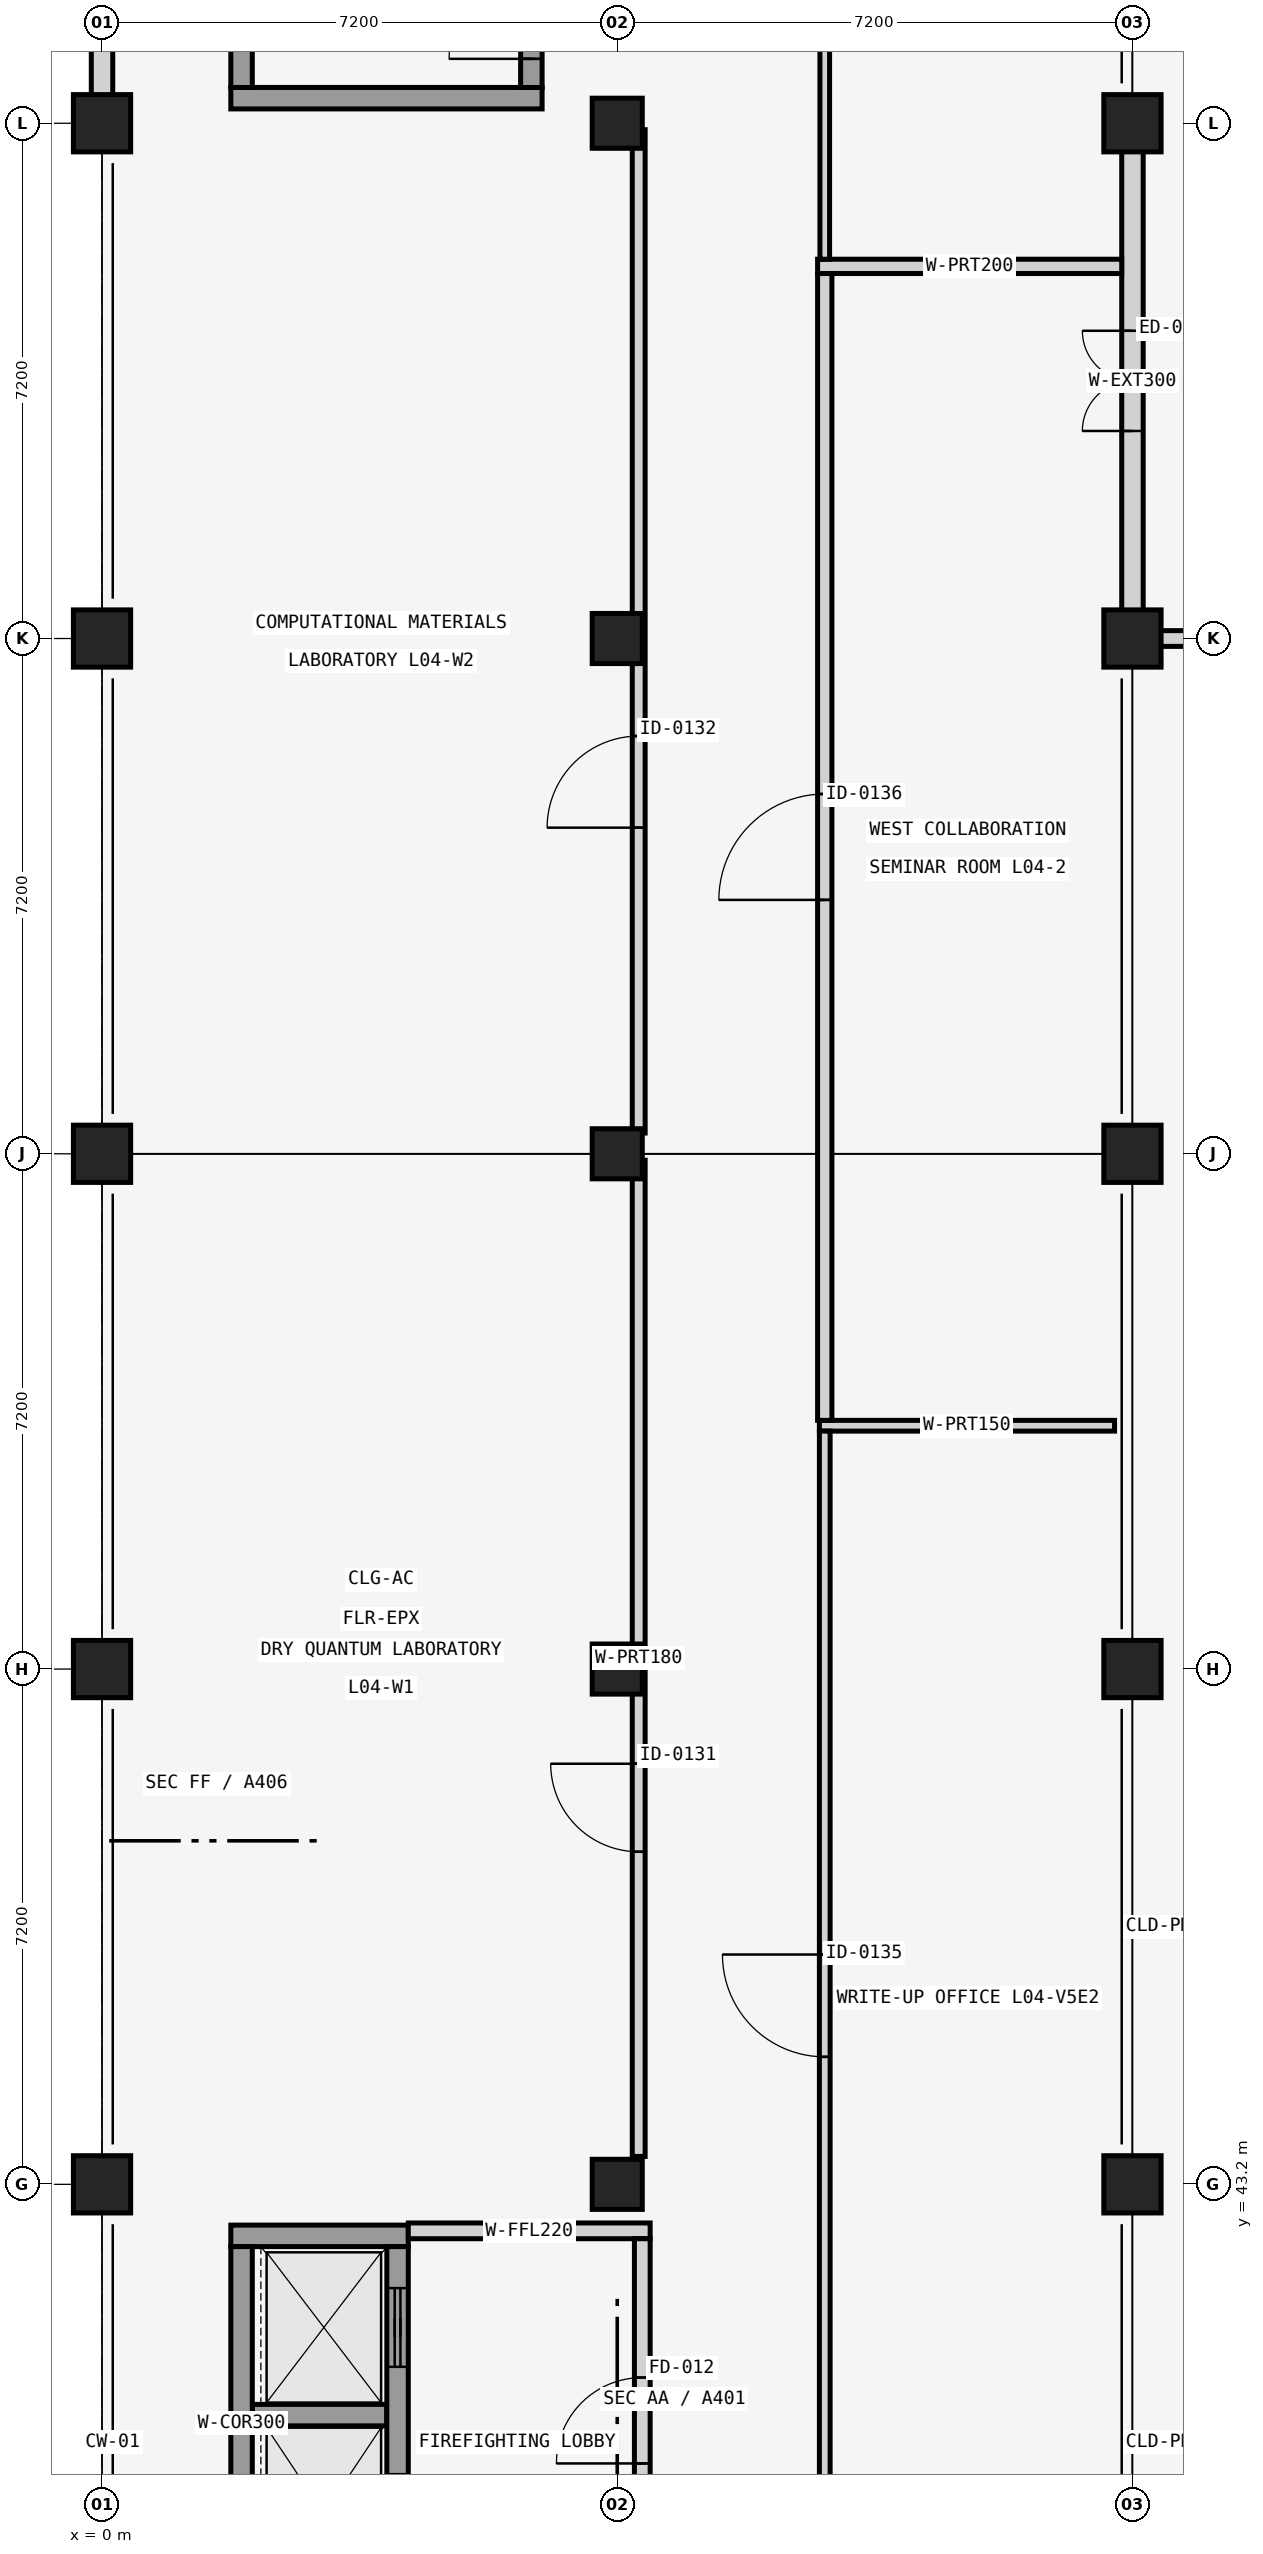
"""IFC4 building model, lengths in metres.
Left out: names, types, materials, properties, quantities, classifications, styles, units other than length and angle.
Written with IfcOpenShell. Run it as: python <this file> out.ifc"""

import sys

from ifc_helpers import new_model, si_unit, direction, frame, frame_2d, origin, origin_2d, place, context, subcontext, project, spatial, rectangle, extrude, element, fill, save


model = new_model("IFC4")
c1 = context("Model", 3, precision=1e-05, world=origin(), true_north=direction((0.0, 1.0)))
c2 = subcontext(c1, "Body", "Model", "MODEL_VIEW")
j1 = project(units=[si_unit("LENGTHUNIT", "METRE"), si_unit("PLANEANGLEUNIT", "RADIAN")], contexts=[c1])
p1 = place(None, origin())
s1 = spatial("IfcSite", under=j1, at=p1, CompositionType="ELEMENT")
p2 = place(p1, origin())
s2 = spatial("IfcBuilding", under=s1, at=p2, CompositionType="ELEMENT")
p3 = place(p2, frame((0.0, 0.0, 17.28)))
s3 = spatial("IfcBuildingStorey", under=s2, at=p3, CompositionType="ELEMENT", Elevation=17.28)
for number, where, z_axis, x_axis in (
    (1, (0.0, 43.2, 0.0), (0.0, 0.0, 1.0), (1.0, 0.0, 0.0)),
    (2, (0.0, 50.4, 0.0), (0.0, 0.0, 1.0), (1.0, 0.0, 0.0)),
    (3, (0.0, 57.6, 0.0), (0.0, 0.0, 1.0), (1.0, 0.0, 0.0)),
    (4, (0.0, 64.8, 0.0), (0.0, 0.0, 1.0), (1.0, 0.0, 0.0)),
    (5, (0.0, 72.0, 0.0), (0.0, 0.0, 1.0), (1.0, 0.0, 0.0)),
):
    element("IfcColumn", number, at=place(p3, frame(where, z_axis=z_axis, x_axis=x_axis)), inside=s3, PredefinedType="COLUMN", context=c2, shape_type="SweptSolid", body=[
        extrude(rectangle(XDim=0.8, YDim=0.8, at=origin_2d()), origin(), (0.0, 0.0, 1.0), 4.16),
    ])
for number, where, z_axis, x_axis in (
    (6, (7.2, 43.2, 0.0), (0.0, 0.0, 1.0), (1.0, 0.0, 0.0)),
    (7, (7.2, 50.4, 0.0), (0.0, 0.0, 1.0), (1.0, 0.0, 0.0)),
    (8, (7.2, 57.6, 0.0), (0.0, 0.0, 1.0), (1.0, 0.0, 0.0)),
    (9, (7.2, 64.8, 0.0), (0.0, 0.0, 1.0), (1.0, 0.0, 0.0)),
    (10, (7.2, 72.0, 0.0), (0.0, 0.0, 1.0), (1.0, 0.0, 0.0)),
):
    element("IfcColumn", number, at=place(p3, frame(where, z_axis=z_axis, x_axis=x_axis)), inside=s3, PredefinedType="COLUMN", context=c2, shape_type="SweptSolid", body=[
        extrude(rectangle(XDim=0.7, YDim=0.7, at=origin_2d()), origin(), (0.0, 0.0, 1.0), 4.16),
    ])
for number, where, z_axis, x_axis in (
    (11, (14.4, 43.2, 0.0), (0.0, 0.0, 1.0), (1.0, 0.0, 0.0)),
    (12, (14.4, 50.4, 0.0), (0.0, 0.0, 1.0), (1.0, 0.0, 0.0)),
    (13, (14.4, 57.6, 0.0), (0.0, 0.0, 1.0), (1.0, 0.0, 0.0)),
    (14, (14.4, 64.8, 0.0), (0.0, 0.0, 1.0), (1.0, 0.0, 0.0)),
    (15, (14.4, 72.0, 0.0), (0.0, 0.0, 1.0), (1.0, 0.0, 0.0)),
):
    element("IfcColumn", number, at=place(p3, frame(where, z_axis=z_axis, x_axis=x_axis)), inside=s3, PredefinedType="COLUMN", context=c2, shape_type="SweptSolid", body=[
        extrude(rectangle(XDim=0.8, YDim=0.8, at=origin_2d()), origin(), (0.0, 0.0, 1.0), 4.16),
    ])
p4 = place(p3, frame((14.4, 65.19, 0.0), z_axis=(0.0, 0.0, 1.0), x_axis=(0.0, 1.0, 0.0)))
e16 = element("IfcWall", 16, at=p4, inside=s3, PredefinedType="SOLIDWALL", context=c2, shape_type="SweptSolid", body=[
    extrude(rectangle(XDim=6.42, YDim=0.3, at=frame_2d((3.21, 0.0))), origin(), (0.0, 0.0, 1.0), 3.21),
])
p5 = place(p4, frame((2.51, 0.0, 0.0)))
e17 = element("IfcOpeningElement", 17, at=p5, cuts=e16, PredefinedType="OPENING", context=c2, shape_type="SweptSolid", body=[
    extrude(rectangle(XDim=1.4, YDim=2.25, at=frame_2d((0.7, 1.125))), frame((0.0, 0.16, 0.0), z_axis=(0.0, -1.0, 0.0), x_axis=(1.0, 0.0, 0.0)), (0.0, 0.0, 1.0), 0.32),
])
p6 = place(p3, frame((0.0, 72.39, 0.0), z_axis=(0.0, 0.0, 1.0), x_axis=(0.0, 1.0, 0.0)))
e18 = element("IfcWall", 18, at=p6, inside=s3, PredefinedType="SOLIDWALL", context=c2, shape_type="SweptSolid", body=[
    extrude(rectangle(XDim=6.42, YDim=0.3, at=frame_2d((3.21, 0.0))), origin(), (0.0, 0.0, 1.0), 3.21),
])
p7 = place(p6, frame((2.985, 0.0, 0.65)))
e19 = element("IfcOpeningElement", 19, at=p7, cuts=e18, PredefinedType="OPENING", context=c2, shape_type="SweptSolid", body=[
    extrude(rectangle(XDim=0.45, YDim=2.4, at=frame_2d((0.225, 1.2))), frame((0.0, 0.16, 0.0), z_axis=(0.0, -1.0, 0.0), x_axis=(1.0, 0.0, 0.0)), (0.0, 0.0, 1.0), 0.32),
])
p8 = place(p3, frame((14.4, 64.8, 0.0), z_axis=(0.0, 0.0, 1.0), x_axis=(1.0, 0.0, 0.0)))
e20 = element("IfcWall", 20, at=p8, inside=s3, PredefinedType="PARAPET", context=c2, shape_type="SweptSolid", body=[
    extrude(rectangle(XDim=28.8, YDim=0.22, at=frame_2d((14.4, 0.0))), origin(), (0.0, 0.0, 1.0), 0.9),
])
p9 = place(p3, frame((1.8, 42.48, 0.0), z_axis=(0.0, 0.0, 1.0), x_axis=(1.0, 0.0, 0.0)))
e21 = element("IfcWall", 21, at=p9, inside=s3, PredefinedType="SHEAR", context=c2, shape_type="SweptSolid", body=[
    extrude(rectangle(XDim=2.48, YDim=0.3, at=frame_2d((1.24, 0.0))), origin(), (0.0, 0.0, 1.0), 3.81),
])
p10 = place(p3, frame((2.1, 39.975, 0.0), z_axis=(0.0, 0.0, 1.0), x_axis=(1.0, 0.0, 0.0)))
e22 = element("IfcWall", 22, at=p10, inside=s3, PredefinedType="SHEAR", context=c2, shape_type="SweptSolid", body=[
    extrude(rectangle(XDim=1.88, YDim=0.3, at=frame_2d((0.94, 0.0))), origin(), (0.0, 0.0, 1.0), 3.81),
])
p11 = place(p3, frame((1.95, 37.4, 0.0), z_axis=(0.0, 0.0, 1.0), x_axis=(0.0, 1.0, 0.0)))
e23 = element("IfcWall", 23, at=p11, inside=s3, PredefinedType="SHEAR", context=c2, shape_type="SweptSolid", body=[
    extrude(rectangle(XDim=4.93, YDim=0.3, at=frame_2d((2.465, 0.0))), origin(), (0.0, 0.0, 1.0), 3.81),
])
p12 = place(p3, frame((4.13, 37.4, 0.0), z_axis=(0.0, 0.0, 1.0), x_axis=(0.0, 1.0, 0.0)))
e24 = element("IfcWall", 24, at=p12, inside=s3, PredefinedType="SHEAR", context=c2, shape_type="SweptSolid", body=[
    extrude(rectangle(XDim=4.93, YDim=0.3, at=frame_2d((2.465, 0.0))), origin(), (0.0, 0.0, 1.0), 3.81),
])
p13 = place(p12, frame((0.65, 0.0, 0.0)))
e25 = element("IfcOpeningElement", 25, at=p13, cuts=e24, PredefinedType="OPENING", context=c2, shape_type="SweptSolid", body=[
    extrude(rectangle(XDim=1.1, YDim=2.2, at=frame_2d((0.55, 1.1))), frame((0.0, 0.16, 0.0), z_axis=(0.0, -1.0, 0.0), x_axis=(1.0, 0.0, 0.0)), (0.0, 0.0, 1.0), 0.32),
])
p14 = place(p12, frame((3.25, 0.0, 0.0)))
e26 = element("IfcOpeningElement", 26, at=p14, cuts=e24, PredefinedType="OPENING", context=c2, shape_type="SweptSolid", body=[
    extrude(rectangle(XDim=1.1, YDim=2.2, at=frame_2d((0.55, 1.1))), frame((0.0, 0.16, 0.0), z_axis=(0.0, -1.0, 0.0), x_axis=(1.0, 0.0, 0.0)), (0.0, 0.0, 1.0), 0.32),
])
p15 = place(p3, frame((4.28, 42.55, 0.0), z_axis=(0.0, 0.0, 1.0), x_axis=(1.0, 0.0, 0.0)))
e27 = element("IfcWall", 27, at=p15, inside=s3, PredefinedType="SOLIDWALL", context=c2, shape_type="SweptSolid", body=[
    extrude(rectangle(XDim=3.38, YDim=0.22, at=frame_2d((1.69, 0.0))), origin(), (0.0, 0.0, 1.0), 3.01),
])
p16 = place(p3, frame((7.55, 37.36, 0.0), z_axis=(0.0, 0.0, 1.0), x_axis=(0.0, 1.0, 0.0)))
e28 = element("IfcWall", 28, at=p16, inside=s3, PredefinedType="SOLIDWALL", context=c2, shape_type="SweptSolid", body=[
    extrude(rectangle(XDim=5.08, YDim=0.22, at=frame_2d((2.54, 0.0))), origin(), (0.0, 0.0, 1.0), 3.51),
])
p17 = place(p16, frame((1.94, 0.0, 0.0)))
e29 = element("IfcOpeningElement", 29, at=p17, cuts=e28, PredefinedType="OPENING", context=c2, shape_type="SweptSolid", body=[
    extrude(rectangle(XDim=1.2, YDim=2.2, at=frame_2d((0.6, 1.1))), frame((0.0, 0.12, 0.0), z_axis=(0.0, -1.0, 0.0), x_axis=(1.0, 0.0, 0.0)), (0.0, 0.0, 1.0), 0.24),
])
p18 = place(p3, frame((1.8, 72.35, 0.0), z_axis=(0.0, 0.0, 1.0), x_axis=(1.0, 0.0, 0.0)))
e30 = element("IfcWall", 30, at=p18, inside=s3, PredefinedType="SHEAR", context=c2, shape_type="SweptSolid", body=[
    extrude(rectangle(XDim=4.35, YDim=0.3, at=frame_2d((2.175, 0.0))), origin(), (0.0, 0.0, 1.0), 3.81),
])
p19 = place(p3, frame((1.95, 72.5, 0.0), z_axis=(0.0, 0.0, 1.0), x_axis=(0.0, 1.0, 0.0)))
e31 = element("IfcWall", 31, at=p19, inside=s3, PredefinedType="SHEAR", context=c2, shape_type="SweptSolid", body=[
    extrude(rectangle(XDim=7.8, YDim=0.3, at=frame_2d((3.9, 0.0))), origin(), (0.0, 0.0, 1.0), 3.81),
])
p20 = place(p3, frame((6.0, 72.5, 0.0), z_axis=(0.0, 0.0, 1.0), x_axis=(0.0, 1.0, 0.0)))
e32 = element("IfcWall", 32, at=p20, inside=s3, PredefinedType="SHEAR", context=c2, shape_type="SweptSolid", body=[
    extrude(rectangle(XDim=7.8, YDim=0.3, at=frame_2d((3.9, 0.0))), origin(), (0.0, 0.0, 1.0), 3.81),
])
p21 = place(p20, frame((0.4, 0.0, 0.0)))
e33 = element("IfcOpeningElement", 33, at=p21, cuts=e32, PredefinedType="OPENING", context=c2, shape_type="SweptSolid", body=[
    extrude(rectangle(XDim=1.15, YDim=2.2, at=frame_2d((0.575, 1.1))), frame((0.0, 0.16, 0.0), z_axis=(0.0, -1.0, 0.0), x_axis=(1.0, 0.0, 0.0)), (0.0, 0.0, 1.0), 0.32),
])
p22 = place(p3, frame((7.5, 43.59, 0.0), z_axis=(0.0, 0.0, 1.0), x_axis=(0.0, 1.0, 0.0)))
e34 = element("IfcWall", 34, at=p22, inside=s3, PredefinedType="PARTITIONING", context=c2, shape_type="SweptSolid", body=[
    extrude(rectangle(XDim=13.92, YDim=0.18, at=frame_2d((6.96, 0.0))), origin(), (0.0, 0.0, 1.0), 3.21),
])
p23 = place(p22, frame((4.257, 0.0, 0.0)))
e35 = element("IfcOpeningElement", 35, at=p23, cuts=e34, PredefinedType="OPENING", context=c2, shape_type="SweptSolid", body=[
    extrude(rectangle(XDim=1.23, YDim=2.12, at=frame_2d((0.615, 1.06))), frame((0.0, 0.1, 0.0), z_axis=(0.0, -1.0, 0.0), x_axis=(1.0, 0.0, 0.0)), (0.0, 0.0, 1.0), 0.2),
])
p24 = place(p3, frame((7.5, 57.89, 0.0), z_axis=(0.0, 0.0, 1.0), x_axis=(0.0, 1.0, 0.0)))
e36 = element("IfcWall", 36, at=p24, inside=s3, PredefinedType="PARTITIONING", context=c2, shape_type="SweptSolid", body=[
    extrude(rectangle(XDim=14.02, YDim=0.18, at=frame_2d((7.01, 0.0))), origin(), (0.0, 0.0, 1.0), 3.21),
])
p25 = place(p24, frame((4.267, 0.0, 0.0)))
e37 = element("IfcOpeningElement", 37, at=p25, cuts=e36, PredefinedType="OPENING", context=c2, shape_type="SweptSolid", body=[
    extrude(rectangle(XDim=1.28, YDim=2.12, at=frame_2d((0.64, 1.06))), frame((0.0, 0.1, 0.0), z_axis=(0.0, -1.0, 0.0), x_axis=(1.0, 0.0, 0.0)), (0.0, 0.0, 1.0), 0.2),
])
p26 = place(p3, frame((10.025, 53.8, 0.0), z_axis=(0.0, 0.0, 1.0), x_axis=(1.0, 0.0, 0.0)))
e38 = element("IfcWall", 38, at=p26, inside=s3, PredefinedType="PARTITIONING", context=c2, shape_type="SweptSolid", body=[
    extrude(rectangle(XDim=4.125, YDim=0.15, at=frame_2d((2.062, 0.0))), origin(), (0.0, 0.0, 1.0), 3.81),
])
p27 = place(p3, frame((10.1, 37.667, 0.0), z_axis=(0.0, 0.0, 1.0), x_axis=(0.0, 1.0, 0.0)))
e39 = element("IfcWall", 39, at=p27, inside=s3, PredefinedType="PARTITIONING", context=c2, shape_type="SweptSolid", body=[
    extrude(rectangle(XDim=16.058, YDim=0.15, at=frame_2d((8.029, 0.0))), origin(), (0.0, 0.0, 1.0), 3.21),
])
p28 = place(p27, frame((7.314, 0.0, 0.0)))
e40 = element("IfcOpeningElement", 40, at=p28, cuts=e39, PredefinedType="OPENING", context=c2, shape_type="SweptSolid", body=[
    extrude(rectangle(XDim=1.43, YDim=2.18, at=frame_2d((0.715, 1.09))), frame((0.0, 0.085, 0.0), z_axis=(0.0, -1.0, 0.0), x_axis=(1.0, 0.0, 0.0)), (0.0, 0.0, 1.0), 0.17),
])
p29 = place(p3, frame((10.0, 70.0, 0.0), z_axis=(0.0, 0.0, 1.0), x_axis=(1.0, 0.0, 0.0)))
e41 = element("IfcWall", 41, at=p29, inside=s3, PredefinedType="PARTITIONING", context=c2, shape_type="SweptSolid", body=[
    extrude(rectangle(XDim=4.25, YDim=0.2, at=frame_2d((2.125, 0.0))), origin(), (0.0, 0.0, 1.0), 3.21),
])
p30 = place(p3, frame((10.1, 53.875, 0.0), z_axis=(0.0, 0.0, 1.0), x_axis=(0.0, 1.0, 0.0)))
e42 = element("IfcWall", 42, at=p30, inside=s3, PredefinedType="PARTITIONING", context=c2, shape_type="SweptSolid", body=[
    extrude(rectangle(XDim=16.025, YDim=0.2, at=frame_2d((8.012, 0.0))), origin(), (0.0, 0.0, 1.0), 3.21),
])
p31 = place(p30, frame((7.272, 0.0, 0.0)))
e43 = element("IfcOpeningElement", 43, at=p31, cuts=e42, PredefinedType="OPENING", context=c2, shape_type="SweptSolid", body=[
    extrude(rectangle(XDim=1.48, YDim=2.18, at=frame_2d((0.74, 1.09))), frame((0.0, 0.11, 0.0), z_axis=(0.0, -1.0, 0.0), x_axis=(1.0, 0.0, 0.0)), (0.0, 0.0, 1.0), 0.22),
])
p32 = place(p3, frame((10.1, 70.1, 0.0), z_axis=(0.0, 0.0, 1.0), x_axis=(0.0, 1.0, 0.0)))
e44 = element("IfcWall", 44, at=p32, inside=s3, PredefinedType="PARTITIONING", context=c2, shape_type="SweptSolid", body=[
    extrude(rectangle(XDim=15.925, YDim=0.135, at=frame_2d((7.962, 0.0))), origin(), (0.0, 0.0, 1.0), 3.21),
])
p33 = place(p32, frame((7.198, 0.0, 0.0)))
e45 = element("IfcOpeningElement", 45, at=p33, cuts=e44, PredefinedType="OPENING", context=c2, shape_type="SweptSolid", body=[
    extrude(rectangle(XDim=1.53, YDim=2.18, at=frame_2d((0.765, 1.09))), frame((0.0, 0.078, 0.0), z_axis=(0.0, -1.0, 0.0), x_axis=(1.0, 0.0, 0.0)), (0.0, 0.0, 1.0), 0.155),
])
p34 = place(p5, frame((1.4, 0.0, 0.0), z_axis=(0.0, 0.0, 1.0), x_axis=(-1.0, 0.0, 0.0)))
e46 = element("IfcDoor", 46, at=p34, inside=s3, OperationType="DOUBLE_DOOR_SINGLE_SWING", PredefinedType="DOOR", context=c2, shape_type="SweptSolid", body=[
    extrude(rectangle(XDim=1.4, YDim=2.25, at=frame_2d((0.7, 1.125))), frame((0.0, 0.025, 0.0), z_axis=(0.0, -1.0, 0.0), x_axis=(1.0, 0.0, 0.0)), (0.0, 0.0, 1.0), 0.05),
])
fill(e17, e46)
p35 = place(p14, origin())
e47 = element("IfcDoor", 47, at=p35, inside=s3, OperationType="SLIDING_TO_LEFT", PredefinedType="DOOR", context=c2, shape_type="SweptSolid", body=[
    extrude(rectangle(XDim=1.1, YDim=2.2, at=frame_2d((0.55, 1.1))), frame((0.0, 0.025, 0.0), z_axis=(0.0, -1.0, 0.0), x_axis=(1.0, 0.0, 0.0)), (0.0, 0.0, 1.0), 0.05),
])
fill(e26, e47)
p36 = place(p17, origin())
e48 = element("IfcDoor", 48, at=p36, inside=s3, OperationType="SINGLE_SWING_LEFT", PredefinedType="DOOR", context=c2, shape_type="SweptSolid", body=[
    extrude(rectangle(XDim=1.2, YDim=2.2, at=frame_2d((0.6, 1.1))), frame((0.0, 0.025, 0.0), z_axis=(0.0, -1.0, 0.0), x_axis=(1.0, 0.0, 0.0)), (0.0, 0.0, 1.0), 0.05),
])
fill(e29, e48)
p37 = place(p21, origin())
e49 = element("IfcDoor", 49, at=p37, inside=s3, OperationType="SINGLE_SWING_LEFT", PredefinedType="DOOR", context=c2, shape_type="SweptSolid", body=[
    extrude(rectangle(XDim=1.15, YDim=2.2, at=frame_2d((0.575, 1.1))), frame((0.0, 0.025, 0.0), z_axis=(0.0, -1.0, 0.0), x_axis=(1.0, 0.0, 0.0)), (0.0, 0.0, 1.0), 0.05),
])
fill(e33, e49)
p38 = place(p23, origin())
e50 = element("IfcDoor", 50, at=p38, inside=s3, OperationType="SINGLE_SWING_RIGHT", PredefinedType="DOOR", context=c2, shape_type="SweptSolid", body=[
    extrude(rectangle(XDim=1.23, YDim=2.12, at=frame_2d((0.615, 1.06))), frame((0.0, 0.025, 0.0), z_axis=(0.0, -1.0, 0.0), x_axis=(1.0, 0.0, 0.0)), (0.0, 0.0, 1.0), 0.05),
])
fill(e35, e50)
p39 = place(p25, origin())
e51 = element("IfcDoor", 51, at=p39, inside=s3, OperationType="SINGLE_SWING_LEFT", PredefinedType="DOOR", context=c2, shape_type="SweptSolid", body=[
    extrude(rectangle(XDim=1.28, YDim=2.12, at=frame_2d((0.64, 1.06))), frame((0.0, 0.025, 0.0), z_axis=(0.0, -1.0, 0.0), x_axis=(1.0, 0.0, 0.0)), (0.0, 0.0, 1.0), 0.05),
])
fill(e37, e51)
p40 = place(p28, origin())
e52 = element("IfcDoor", 52, at=p40, inside=s3, OperationType="SINGLE_SWING_RIGHT", PredefinedType="DOOR", context=c2, shape_type="SweptSolid", body=[
    extrude(rectangle(XDim=1.43, YDim=2.18, at=frame_2d((0.715, 1.09))), frame((0.0, 0.025, 0.0), z_axis=(0.0, -1.0, 0.0), x_axis=(1.0, 0.0, 0.0)), (0.0, 0.0, 1.0), 0.05),
])
fill(e40, e52)
p41 = place(p31, origin())
e53 = element("IfcDoor", 53, at=p41, inside=s3, OperationType="SINGLE_SWING_LEFT", PredefinedType="DOOR", context=c2, shape_type="SweptSolid", body=[
    extrude(rectangle(XDim=1.48, YDim=2.18, at=frame_2d((0.74, 1.09))), frame((0.0, 0.025, 0.0), z_axis=(0.0, -1.0, 0.0), x_axis=(1.0, 0.0, 0.0)), (0.0, 0.0, 1.0), 0.05),
])
fill(e43, e53)
save(model, sys.argv[1])
